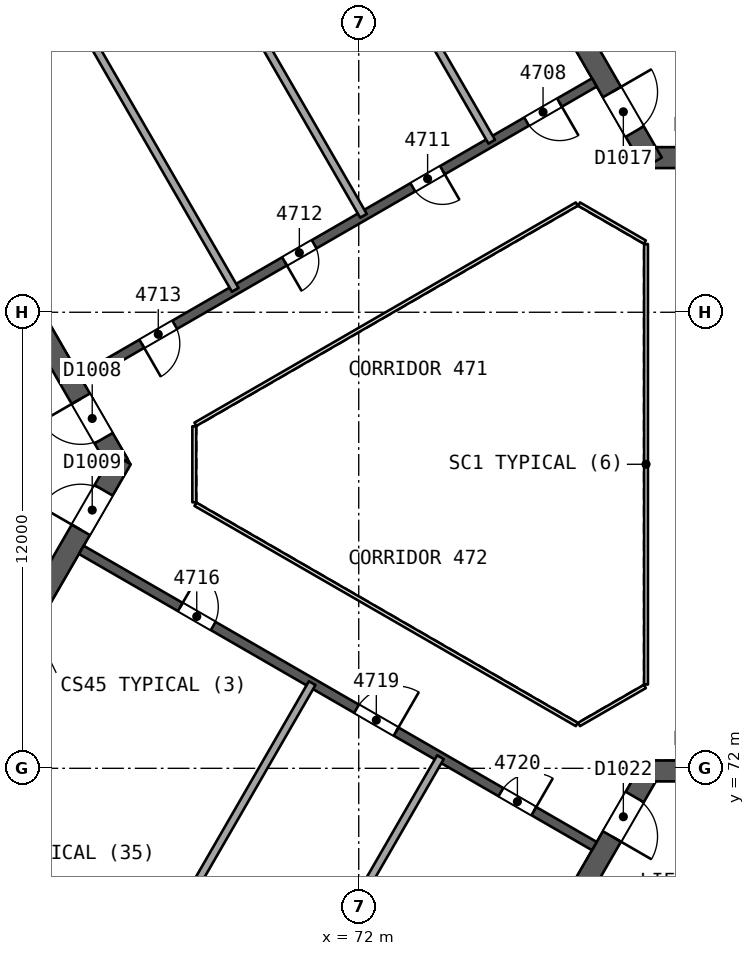
"""IFC4 building model, lengths in metres.
Left out: names, types, materials, properties, quantities, classifications, styles, units other than length and angle.
Written with IfcOpenShell. Run it as: python <this file> out.ifc"""

import sys

from ifc_helpers import new_model, si_unit, direction, frame, frame_2d, origin, place, context, subcontext, project, spatial, rectangle, extrude, element, fill, save


model = new_model("IFC4")
c1 = context("Model", 3, precision=1e-05, world=origin(), true_north=direction((0.0, 1.0)))
c2 = subcontext(c1, "Body", "Model", "MODEL_VIEW")
j1 = project(units=[si_unit("LENGTHUNIT", "METRE"), si_unit("PLANEANGLEUNIT", "RADIAN")], contexts=[c1])
p1 = place(None, origin())
s1 = spatial("IfcSite", under=j1, at=p1, CompositionType="ELEMENT")
p2 = place(p1, origin())
s2 = spatial("IfcBuilding", under=s1, at=p2, CompositionType="ELEMENT")
p3 = place(p2, frame((0.0, 0.0, 193.3)))
s3 = spatial("IfcBuildingStorey", under=s2, at=p3, CompositionType="ELEMENT", Elevation=193.3)
p4 = place(p3, frame((65.682, 80.0, 0.0), z_axis=(0.0, 0.0, 1.0), x_axis=(-0.500000202252, 0.866025287014, 0.0)))
e1 = element("IfcWall", 1, at=p4, inside=s3, PredefinedType="SHEAR", context=c2, shape_type="SweptSolid", body=[
    extrude(rectangle(XDim=10.221, YDim=0.55, at=frame_2d((5.111, 0.0))), origin(), (0.0, 0.0, 1.0), 3.7),
])
p5 = place(p4, frame((0.791, 0.0, 0.0)))
e2 = element("IfcOpeningElement", 2, at=p5, cuts=e1, PredefinedType="OPENING", context=c2, shape_type="SweptSolid", body=[
    extrude(rectangle(XDim=1.2, YDim=2.1, at=frame_2d((0.6, 1.05))), frame((0.0, 0.286, 0.0), z_axis=(0.0, -1.0, 0.0), x_axis=(1.0, 0.0, 0.0)), (0.0, 0.0, 1.0), 0.571),
])
p6 = place(p3, frame((60.709, 71.386, 0.0), z_axis=(0.0, 0.0, 1.0), x_axis=(0.500015938302, 0.866016201606, 0.0)))
e3 = element("IfcWall", 3, at=p6, inside=s3, PredefinedType="SHEAR", context=c2, shape_type="SweptSolid", body=[
    extrude(rectangle(XDim=10.105, YDim=0.55, at=frame_2d((5.053, 0.0))), origin(), (0.0, 0.0, 1.0), 3.7),
])
p7 = place(p6, frame((7.955, 0.0, 0.0)))
e4 = element("IfcOpeningElement", 4, at=p7, cuts=e3, PredefinedType="OPENING", context=c2, shape_type="SweptSolid", body=[
    extrude(rectangle(XDim=1.2, YDim=2.1, at=frame_2d((0.6, 1.05))), frame((0.0, 0.286, 0.0), z_axis=(0.0, -1.0, 0.0), x_axis=(1.0, 0.0, 0.0)), (0.0, 0.0, 1.0), 0.571),
])
p8 = place(p3, frame((79.659, 88.069, 0.0), z_axis=(0.0, 0.0, 1.0), x_axis=(1.0, 0.0, 0.0)))
e5 = element("IfcWall", 5, at=p8, inside=s3, PredefinedType="SHEAR", context=c2, shape_type="SweptSolid", body=[
    extrude(rectangle(XDim=10.221, YDim=0.55, at=frame_2d((5.111, 0.0))), origin(), (0.0, 0.0, 1.0), 3.7),
])
p9 = place(p8, frame((0.791, 0.0, 0.0)))
e6 = element("IfcOpeningElement", 6, at=p9, cuts=e5, PredefinedType="OPENING", context=c2, shape_type="SweptSolid", body=[
    extrude(rectangle(XDim=1.2, YDim=2.1, at=frame_2d((0.6, 1.05))), frame((0.0, 0.286, 0.0), z_axis=(0.0, -1.0, 0.0), x_axis=(1.0, 0.0, 0.0)), (0.0, 0.0, 1.0), 0.571),
])
p10 = place(p3, frame((74.686, 96.683, 0.0), z_axis=(0.0, 0.0, 1.0), x_axis=(0.499997818338, -0.866026663364, 0.0)))
e7 = element("IfcWall", 7, at=p10, inside=s3, PredefinedType="SHEAR", context=c2, shape_type="SweptSolid", body=[
    extrude(rectangle(XDim=10.105, YDim=0.55, at=frame_2d((5.052, 0.0))), origin(), (0.0, 0.0, 1.0), 3.7),
])
p11 = place(p10, frame((7.955, 0.0, 0.0)))
e8 = element("IfcOpeningElement", 8, at=p11, cuts=e7, PredefinedType="OPENING", context=c2, shape_type="SweptSolid", body=[
    extrude(rectangle(XDim=1.2, YDim=2.1, at=frame_2d((0.6, 1.05))), frame((0.0, 0.286, 0.0), z_axis=(0.0, -1.0, 0.0), x_axis=(1.0, 0.0, 0.0)), (0.0, 0.0, 1.0), 0.571),
])
p12 = place(p3, frame((79.659, 71.931, 0.0), z_axis=(0.0, 0.0, 1.0), x_axis=(-0.500000202252, -0.866025287014, 0.0)))
e9 = element("IfcWall", 9, at=p12, inside=s3, PredefinedType="SHEAR", context=c2, shape_type="SweptSolid", body=[
    extrude(rectangle(XDim=10.221, YDim=0.55, at=frame_2d((5.111, 0.0))), origin(), (0.0, 0.0, 1.0), 3.7),
])
p13 = place(p12, frame((0.791, 0.0, 0.0)))
e10 = element("IfcOpeningElement", 10, at=p13, cuts=e9, PredefinedType="OPENING", context=c2, shape_type="SweptSolid", body=[
    extrude(rectangle(XDim=1.2, YDim=2.1, at=frame_2d((0.6, 1.05))), frame((0.0, 0.286, 0.0), z_axis=(0.0, -1.0, 0.0), x_axis=(1.0, 0.0, 0.0)), (0.0, 0.0, 1.0), 0.571),
])
p14 = place(p3, frame((89.605, 71.931, 0.0), z_axis=(0.0, 0.0, 1.0), x_axis=(-1.0, 0.0, 0.0)))
e11 = element("IfcWall", 11, at=p14, inside=s3, PredefinedType="SHEAR", context=c2, shape_type="SweptSolid", body=[
    extrude(rectangle(XDim=10.105, YDim=0.55, at=frame_2d((5.052, 0.0))), origin(), (0.0, 0.0, 1.0), 3.7),
])
p15 = place(p14, frame((7.955, 0.0, 0.0)))
e12 = element("IfcOpeningElement", 12, at=p15, cuts=e11, PredefinedType="OPENING", context=c2, shape_type="SweptSolid", body=[
    extrude(rectangle(XDim=1.2, YDim=2.1, at=frame_2d((0.6, 1.05))), frame((0.0, 0.286, 0.0), z_axis=(0.0, -1.0, 0.0), x_axis=(1.0, 0.0, 0.0)), (0.0, 0.0, 1.0), 0.571),
])
p16 = place(p3, frame((78.2, 90.046, 0.0), z_axis=(0.0, 0.0, 1.0), x_axis=(-0.866026492143, -0.499998114903, 0.0)))
e13 = element("IfcWall", 13, at=p16, inside=s3, PredefinedType="SHEAR", context=c2, shape_type="SweptSolid", body=[
    extrude(rectangle(XDim=15.588, YDim=0.25, at=frame_2d((7.794, 0.0))), origin(), (0.0, 0.0, 1.0), 3.3),
])
p17 = place(p16, frame((1.059, 0.0, 0.0)))
e14 = element("IfcOpeningElement", 14, at=p17, cuts=e13, PredefinedType="OPENING", context=c2, shape_type="SweptSolid", body=[
    extrude(rectangle(XDim=1.0, YDim=2.1, at=frame_2d((0.5, 1.05))), frame((0.0, 0.135, 0.0), z_axis=(0.0, -1.0, 0.0), x_axis=(1.0, 0.0, 0.0)), (0.0, 0.0, 1.0), 0.271),
])
p18 = place(p16, frame((4.616, 0.0, 0.0)))
e15 = element("IfcOpeningElement", 15, at=p18, cuts=e13, PredefinedType="OPENING", context=c2, shape_type="SweptSolid", body=[
    extrude(rectangle(XDim=0.9, YDim=2.1, at=frame_2d((0.45, 1.05))), frame((0.0, 0.135, 0.0), z_axis=(0.0, -1.0, 0.0), x_axis=(1.0, 0.0, 0.0)), (0.0, 0.0, 1.0), 0.271),
])
p19 = place(p16, frame((8.513, 0.0, 0.0)))
e16 = element("IfcOpeningElement", 16, at=p19, cuts=e13, PredefinedType="OPENING", context=c2, shape_type="SweptSolid", body=[
    extrude(rectangle(XDim=0.9, YDim=2.1, at=frame_2d((0.45, 1.05))), frame((0.0, 0.135, 0.0), z_axis=(0.0, -1.0, 0.0), x_axis=(1.0, 0.0, 0.0)), (0.0, 0.0, 1.0), 0.271),
])
p20 = place(p16, frame((12.75, 0.0, 0.0)))
e17 = element("IfcOpeningElement", 17, at=p20, cuts=e13, PredefinedType="OPENING", context=c2, shape_type="SweptSolid", body=[
    extrude(rectangle(XDim=1.0, YDim=2.1, at=frame_2d((0.5, 1.05))), frame((0.0, 0.135, 0.0), z_axis=(0.0, -1.0, 0.0), x_axis=(1.0, 0.0, 0.0)), (0.0, 0.0, 1.0), 0.271),
])
p21 = place(p3, frame((64.7, 77.748, 0.0), z_axis=(0.0, 0.0, 1.0), x_axis=(0.866026492143, -0.499998114903, 0.0)))
e18 = element("IfcWall", 18, at=p21, inside=s3, PredefinedType="SHEAR", context=c2, shape_type="SweptSolid", body=[
    extrude(rectangle(XDim=15.588, YDim=0.25, at=frame_2d((7.794, 0.0))), origin(), (0.0, 0.0, 1.0), 3.3),
])
p22 = place(p21, frame((3.007, 0.0, 0.0)))
e19 = element("IfcOpeningElement", 19, at=p22, cuts=e18, PredefinedType="OPENING", context=c2, shape_type="SweptSolid", body=[
    extrude(rectangle(XDim=1.0, YDim=2.1, at=frame_2d((0.5, 1.05))), frame((0.0, 0.135, 0.0), z_axis=(0.0, -1.0, 0.0), x_axis=(1.0, 0.0, 0.0)), (0.0, 0.0, 1.0), 0.271),
])
p23 = place(p21, frame((8.363, 0.0, 0.0)))
e20 = element("IfcOpeningElement", 20, at=p23, cuts=e18, PredefinedType="OPENING", context=c2, shape_type="SweptSolid", body=[
    extrude(rectangle(XDim=1.2, YDim=2.4, at=frame_2d((0.6, 1.2))), frame((0.0, 0.135, 0.0), z_axis=(0.0, -1.0, 0.0), x_axis=(1.0, 0.0, 0.0)), (0.0, 0.0, 1.0), 0.271),
])
p24 = place(p21, frame((12.75, 0.0, 0.0)))
e21 = element("IfcOpeningElement", 21, at=p24, cuts=e18, PredefinedType="OPENING", context=c2, shape_type="SweptSolid", body=[
    extrude(rectangle(XDim=1.0, YDim=2.1, at=frame_2d((0.5, 1.05))), frame((0.0, 0.135, 0.0), z_axis=(0.0, -1.0, 0.0), x_axis=(1.0, 0.0, 0.0)), (0.0, 0.0, 1.0), 0.271),
])
for number, where, z_axis, x_axis in (
    (22, (70.023, 97.974, 0.0), (0.0, 0.0, 1.0), (0.5, -0.866, 0.0)),
    (23, (66.648, 96.025, 0.0), (0.0, 0.0, 1.0), (0.5, -0.866, 0.0)),
    (24, (63.273, 94.076, 0.0), (0.0, 0.0, 1.0), (0.5, -0.866, 0.0)),
    (25, (65.298, 64.754, 0.0), (0.0, 0.0, 1.0), (0.5, 0.866, 0.0)),
    (26, (68.673, 62.806, 0.0), (0.0, 0.0, 1.0), (0.5, 0.866, 0.0)),
):
    element("IfcWall", number, at=place(p3, frame(where, z_axis=z_axis, x_axis=x_axis)), inside=s3, PredefinedType="PARTITIONING", context=c2, shape_type="SweptSolid", body=[
        extrude(rectangle(XDim=10.954, YDim=0.2, at=frame_2d((5.477, 0.0))), origin(), (0.0, 0.0, 1.0), 3.3),
    ])
p25 = place(p3, frame((43.232, 82.678, 0.0), z_axis=(0.0, 0.0, 1.0), x_axis=(0.866025125259, 0.500000482419, 0.0)))
e27 = element("IfcWall", 27, at=p25, inside=s3, PredefinedType="SOLIDWALL", context=c2, shape_type="SweptSolid", body=[
    extrude(rectangle(XDim=52.347, YDim=0.3, at=frame_2d((26.173, 0.0))), origin(), (0.0, 0.0, 1.0), 3.3),
])
p26 = place(p25, frame((31.209, 0.0, 0.0)))
e28 = element("IfcOpeningElement", 28, at=p26, cuts=e27, PredefinedType="OPENING", context=c2, shape_type="SweptSolid", body=[
    extrude(rectangle(XDim=2.4, YDim=2.4, at=frame_2d((1.2, 1.2))), frame((0.0, 0.161, 0.0), z_axis=(0.0, -1.0, 0.0), x_axis=(1.0, 0.0, 0.0)), (0.0, 0.0, 1.0), 0.321),
])
p27 = place(p25, frame((40.7, 0.0, 0.0)))
e29 = element("IfcOpeningElement", 29, at=p27, cuts=e27, PredefinedType="OPENING", context=c2, shape_type="SweptSolid", body=[
    extrude(rectangle(XDim=2.4, YDim=2.4, at=frame_2d((1.2, 1.2))), frame((0.0, 0.161, 0.0), z_axis=(0.0, -1.0, 0.0), x_axis=(1.0, 0.0, 0.0)), (0.0, 0.0, 1.0), 0.321),
])
p28 = place(p25, frame((19.517, 0.0, 0.0)))
e30 = element("IfcOpeningElement", 30, at=p28, cuts=e27, PredefinedType="OPENING", context=c2, shape_type="SweptSolid", body=[
    extrude(rectangle(XDim=2.4, YDim=2.4, at=frame_2d((1.2, 1.2))), frame((0.0, 0.161, 0.0), z_axis=(0.0, -1.0, 0.0), x_axis=(1.0, 0.0, 0.0)), (0.0, 0.0, 1.0), 0.321),
])
p29 = place(p25, frame((9.27, 0.0, 0.0)))
e31 = element("IfcOpeningElement", 31, at=p29, cuts=e27, PredefinedType="OPENING", context=c2, shape_type="SweptSolid", body=[
    extrude(rectangle(XDim=2.4, YDim=2.4, at=frame_2d((1.2, 1.2))), frame((0.0, 0.161, 0.0), z_axis=(0.0, -1.0, 0.0), x_axis=(1.0, 0.0, 0.0)), (0.0, 0.0, 1.0), 0.321),
])
p30 = place(p25, frame((28.001, 0.0, 0.9)))
e32 = element("IfcOpeningElement", 32, at=p30, cuts=e27, PredefinedType="OPENING", context=c2, shape_type="SweptSolid", body=[
    extrude(rectangle(XDim=1.8, YDim=1.5, at=frame_2d((0.9, 0.75))), frame((0.0, 0.161, 0.0), z_axis=(0.0, -1.0, 0.0), x_axis=(1.0, 0.0, 0.0)), (0.0, 0.0, 1.0), 0.321),
])
p31 = place(p25, frame((24.104, 0.0, 0.9)))
e33 = element("IfcOpeningElement", 33, at=p31, cuts=e27, PredefinedType="OPENING", context=c2, shape_type="SweptSolid", body=[
    extrude(rectangle(XDim=1.8, YDim=1.5, at=frame_2d((0.9, 0.75))), frame((0.0, 0.161, 0.0), z_axis=(0.0, -1.0, 0.0), x_axis=(1.0, 0.0, 0.0)), (0.0, 0.0, 1.0), 0.321),
])
p32 = place(p3, frame((88.565, 51.149, 0.0), z_axis=(0.0, 0.0, 1.0), x_axis=(-0.866025125259, 0.500000482419, 0.0)))
e34 = element("IfcWall", 34, at=p32, inside=s3, PredefinedType="SOLIDWALL", context=c2, shape_type="SweptSolid", body=[
    extrude(rectangle(XDim=52.347, YDim=0.3, at=frame_2d((26.173, 0.0))), origin(), (0.0, 0.0, 1.0), 3.3),
])
p33 = place(p32, frame((29.26, 0.0, 0.0)))
e35 = element("IfcOpeningElement", 35, at=p33, cuts=e34, PredefinedType="OPENING", context=c2, shape_type="SweptSolid", body=[
    extrude(rectangle(XDim=2.4, YDim=2.4, at=frame_2d((1.2, 1.2))), frame((0.0, 0.161, 0.0), z_axis=(0.0, -1.0, 0.0), x_axis=(1.0, 0.0, 0.0)), (0.0, 0.0, 1.0), 0.321),
])
p34 = place(p32, frame((40.7, 0.0, 0.0)))
e36 = element("IfcOpeningElement", 36, at=p34, cuts=e34, PredefinedType="OPENING", context=c2, shape_type="SweptSolid", body=[
    extrude(rectangle(XDim=2.4, YDim=2.4, at=frame_2d((1.2, 1.2))), frame((0.0, 0.161, 0.0), z_axis=(0.0, -1.0, 0.0), x_axis=(1.0, 0.0, 0.0)), (0.0, 0.0, 1.0), 0.321),
])
p35 = place(p32, frame((19.517, 0.0, 0.0)))
e37 = element("IfcOpeningElement", 37, at=p35, cuts=e34, PredefinedType="OPENING", context=c2, shape_type="SweptSolid", body=[
    extrude(rectangle(XDim=2.4, YDim=2.4, at=frame_2d((1.2, 1.2))), frame((0.0, 0.161, 0.0), z_axis=(0.0, -1.0, 0.0), x_axis=(1.0, 0.0, 0.0)), (0.0, 0.0, 1.0), 0.321),
])
p36 = place(p32, frame((9.27, 0.0, 0.0)))
e38 = element("IfcOpeningElement", 38, at=p36, cuts=e34, PredefinedType="OPENING", context=c2, shape_type="SweptSolid", body=[
    extrude(rectangle(XDim=2.4, YDim=2.4, at=frame_2d((1.2, 1.2))), frame((0.0, 0.161, 0.0), z_axis=(0.0, -1.0, 0.0), x_axis=(1.0, 0.0, 0.0)), (0.0, 0.0, 1.0), 0.321),
])
p37 = place(p32, frame((24.104, 0.0, 0.9)))
e39 = element("IfcOpeningElement", 39, at=p37, cuts=e34, PredefinedType="OPENING", context=c2, shape_type="SweptSolid", body=[
    extrude(rectangle(XDim=1.8, YDim=1.5, at=frame_2d((0.9, 0.75))), frame((0.0, 0.161, 0.0), z_axis=(0.0, -1.0, 0.0), x_axis=(1.0, 0.0, 0.0)), (0.0, 0.0, 1.0), 0.321),
])
p38 = place(p3, frame((86.77, 89.486, 0.0), z_axis=(0.0, 0.0, 1.0), x_axis=(-0.86601811187, 0.500012629753, 0.0)))
e40 = element("IfcWall", 40, at=p38, inside=s3, PredefinedType="SOLIDWALL", context=c2, shape_type="SweptSolid", body=[
    extrude(rectangle(XDim=10.9, YDim=0.2, at=frame_2d((5.45, 0.0))), origin(), (0.0, 0.0, 1.0), 3.3),
])
p39 = place(p38, frame((0.575, 0.0, 0.0)))
e41 = element("IfcOpeningElement", 41, at=p39, cuts=e40, PredefinedType="OPENING", context=c2, shape_type="SweptSolid", body=[
    extrude(rectangle(XDim=1.1, YDim=2.1, at=frame_2d((0.55, 1.05))), frame((0.0, 0.11, 0.0), z_axis=(0.0, -1.0, 0.0), x_axis=(1.0, 0.0, 0.0)), (0.0, 0.0, 1.0), 0.221),
])
p40 = place(p38, frame((2.825, 0.0, 0.0)))
e42 = element("IfcOpeningElement", 42, at=p40, cuts=e40, PredefinedType="OPENING", context=c2, shape_type="SweptSolid", body=[
    extrude(rectangle(XDim=1.1, YDim=2.1, at=frame_2d((0.55, 1.05))), frame((0.0, 0.11, 0.0), z_axis=(0.0, -1.0, 0.0), x_axis=(1.0, 0.0, 0.0)), (0.0, 0.0, 1.0), 0.221),
])
p41 = place(p38, frame((5.075, 0.0, 0.0)))
e43 = element("IfcOpeningElement", 43, at=p41, cuts=e40, PredefinedType="OPENING", context=c2, shape_type="SweptSolid", body=[
    extrude(rectangle(XDim=1.1, YDim=2.1, at=frame_2d((0.55, 1.05))), frame((0.0, 0.11, 0.0), z_axis=(0.0, -1.0, 0.0), x_axis=(1.0, 0.0, 0.0)), (0.0, 0.0, 1.0), 0.221),
])
p42 = place(p38, frame((7.325, 0.0, 0.0)))
e44 = element("IfcOpeningElement", 44, at=p42, cuts=e40, PredefinedType="OPENING", context=c2, shape_type="SweptSolid", body=[
    extrude(rectangle(XDim=1.1, YDim=2.1, at=frame_2d((0.55, 1.05))), frame((0.0, 0.11, 0.0), z_axis=(0.0, -1.0, 0.0), x_axis=(1.0, 0.0, 0.0)), (0.0, 0.0, 1.0), 0.221),
])
p43 = place(p3, frame((89.33, 90.872, 0.0), z_axis=(0.0, 0.0, 1.0), x_axis=(-0.866027589512, 0.49999621419, 0.0)))
e45 = element("IfcWall", 45, at=p43, inside=s3, PredefinedType="SOLIDWALL", context=c2, shape_type="SweptSolid", body=[
    extrude(rectangle(XDim=10.524, YDim=0.2, at=frame_2d((5.262, 0.0))), origin(), (0.0, 0.0, 1.0), 3.3),
])
p44 = place(p43, frame((0.312, 0.0, 0.0)))
e46 = element("IfcOpeningElement", 46, at=p44, cuts=e45, PredefinedType="OPENING", context=c2, shape_type="SweptSolid", body=[
    extrude(rectangle(XDim=0.9, YDim=2.1, at=frame_2d((0.45, 1.05))), frame((0.0, 0.11, 0.0), z_axis=(0.0, -1.0, 0.0), x_axis=(1.0, 0.0, 0.0)), (0.0, 0.0, 1.0), 0.221),
])
p45 = place(p3, frame((77.135, 64.952, 0.0), z_axis=(0.0, 0.0, 1.0), x_axis=(0.866031916153, 0.499988720078, 0.0)))
e47 = element("IfcWall", 47, at=p45, inside=s3, PredefinedType="SOLIDWALL", context=c2, shape_type="SweptSolid", body=[
    extrude(rectangle(XDim=11.35, YDim=0.2, at=frame_2d((5.675, 0.0))), origin(), (0.0, 0.0, 1.0), 3.3),
])
p46 = place(p3, frame((79.56, 74.206, 0.0), z_axis=(0.0, 0.0, 1.0), x_axis=(0.0, 1.0, 0.0)))
e48 = element("IfcWall", 48, at=p46, inside=s3, PredefinedType="PARTITIONING", context=c2, shape_type="SweptSolid", body=[
    extrude(rectangle(XDim=11.588, YDim=0.1, at=frame_2d((5.794, 0.0))), origin(), (0.0, 0.0, 1.0), 3.3),
])
p47 = place(p3, frame((79.53, 85.846, 0.0), z_axis=(0.0, 0.0, 1.0), x_axis=(-0.866041268327, 0.499972520799, 0.0)))
e49 = element("IfcWall", 49, at=p47, inside=s3, PredefinedType="PARTITIONING", context=c2, shape_type="SweptSolid", body=[
    extrude(rectangle(XDim=2.0, YDim=0.1, at=frame_2d((1.0, 0.0))), origin(), (0.0, 0.0, 1.0), 3.3),
])
p48 = place(p3, frame((77.738, 86.846, 0.0), z_axis=(0.0, 0.0, 1.0), x_axis=(-0.866026658274, -0.499997827154, 0.0)))
e50 = element("IfcWall", 50, at=p48, inside=s3, PredefinedType="PARTITIONING", context=c2, shape_type="SweptSolid", body=[
    extrude(rectangle(XDim=11.588, YDim=0.1, at=frame_2d((5.794, 0.0))), origin(), (0.0, 0.0, 1.0), 3.3),
])
p49 = place(p3, frame((67.672, 81.0, 0.0), z_axis=(0.0, 0.0, 1.0), x_axis=(0.0, -1.0, 0.0)))
e51 = element("IfcWall", 51, at=p49, inside=s3, PredefinedType="PARTITIONING", context=c2, shape_type="SweptSolid", body=[
    extrude(rectangle(XDim=2.0, YDim=0.1, at=frame_2d((1.0, 0.0))), origin(), (0.0, 0.0, 1.0), 3.3),
])
p50 = place(p3, frame((67.702, 78.948, 0.0), z_axis=(0.0, 0.0, 1.0), x_axis=(0.866026658274, -0.499997827154, 0.0)))
e52 = element("IfcWall", 52, at=p50, inside=s3, PredefinedType="PARTITIONING", context=c2, shape_type="SweptSolid", body=[
    extrude(rectangle(XDim=11.588, YDim=0.1, at=frame_2d((5.794, 0.0))), origin(), (0.0, 0.0, 1.0), 3.3),
])
p51 = place(p3, frame((77.798, 73.154, 0.0), z_axis=(0.0, 0.0, 1.0), x_axis=(0.866041268327, 0.499972520799, 0.0)))
e53 = element("IfcWall", 53, at=p51, inside=s3, PredefinedType="PARTITIONING", context=c2, shape_type="SweptSolid", body=[
    extrude(rectangle(XDim=2.0, YDim=0.1, at=frame_2d((1.0, 0.0))), origin(), (0.0, 0.0, 1.0), 3.3),
])
p52 = place(p17, origin())
e54 = element("IfcDoor", 54, at=p52, inside=s3, OperationType="SINGLE_SWING_LEFT", PredefinedType="NOTDEFINED", context=c2, shape_type="SweptSolid", body=[
    extrude(rectangle(XDim=1.0, YDim=2.1, at=frame_2d((0.5, 1.05))), frame((0.0, 0.025, 0.0), z_axis=(0.0, -1.0, 0.0), x_axis=(1.0, 0.0, 0.0)), (0.0, 0.0, 1.0), 0.05),
])
fill(e14, e54)
p53 = place(p18, origin())
e55 = element("IfcDoor", 55, at=p53, inside=s3, OperationType="SINGLE_SWING_LEFT", PredefinedType="NOTDEFINED", context=c2, shape_type="SweptSolid", body=[
    extrude(rectangle(XDim=0.9, YDim=2.1, at=frame_2d((0.45, 1.05))), frame((0.0, 0.025, 0.0), z_axis=(0.0, -1.0, 0.0), x_axis=(1.0, 0.0, 0.0)), (0.0, 0.0, 1.0), 0.05),
])
fill(e15, e55)
p54 = place(p19, origin())
e56 = element("IfcDoor", 56, at=p54, inside=s3, OperationType="SINGLE_SWING_RIGHT", PredefinedType="NOTDEFINED", context=c2, shape_type="SweptSolid", body=[
    extrude(rectangle(XDim=0.9, YDim=2.1, at=frame_2d((0.45, 1.05))), frame((0.0, 0.025, 0.0), z_axis=(0.0, -1.0, 0.0), x_axis=(1.0, 0.0, 0.0)), (0.0, 0.0, 1.0), 0.05),
])
fill(e16, e56)
p55 = place(p20, origin())
e57 = element("IfcDoor", 57, at=p55, inside=s3, OperationType="SINGLE_SWING_RIGHT", PredefinedType="NOTDEFINED", context=c2, shape_type="SweptSolid", body=[
    extrude(rectangle(XDim=1.0, YDim=2.1, at=frame_2d((0.5, 1.05))), frame((0.0, 0.025, 0.0), z_axis=(0.0, -1.0, 0.0), x_axis=(1.0, 0.0, 0.0)), (0.0, 0.0, 1.0), 0.05),
])
fill(e17, e57)
p56 = place(p22, origin())
e58 = element("IfcDoor", 58, at=p56, inside=s3, OperationType="SINGLE_SWING_LEFT", PredefinedType="NOTDEFINED", context=c2, shape_type="SweptSolid", body=[
    extrude(rectangle(XDim=1.0, YDim=2.1, at=frame_2d((0.5, 1.05))), frame((0.0, 0.025, 0.0), z_axis=(0.0, -1.0, 0.0), x_axis=(1.0, 0.0, 0.0)), (0.0, 0.0, 1.0), 0.05),
])
fill(e19, e58)
p57 = place(p23, origin())
e59 = element("IfcDoor", 59, at=p57, inside=s3, OperationType="SINGLE_SWING_RIGHT", PredefinedType="NOTDEFINED", context=c2, shape_type="SweptSolid", body=[
    extrude(rectangle(XDim=1.2, YDim=2.4, at=frame_2d((0.6, 1.2))), frame((0.0, 0.025, 0.0), z_axis=(0.0, -1.0, 0.0), x_axis=(1.0, 0.0, 0.0)), (0.0, 0.0, 1.0), 0.05),
])
fill(e20, e59)
p58 = place(p24, origin())
e60 = element("IfcDoor", 60, at=p58, inside=s3, OperationType="SINGLE_SWING_RIGHT", PredefinedType="NOTDEFINED", context=c2, shape_type="SweptSolid", body=[
    extrude(rectangle(XDim=1.0, YDim=2.1, at=frame_2d((0.5, 1.05))), frame((0.0, 0.025, 0.0), z_axis=(0.0, -1.0, 0.0), x_axis=(1.0, 0.0, 0.0)), (0.0, 0.0, 1.0), 0.05),
])
fill(e21, e60)
p59 = place(p5, origin())
e61 = element("IfcDoor", 61, at=p59, inside=s3, OperationType="SINGLE_SWING_RIGHT", PredefinedType="NOTDEFINED", context=c2, shape_type="SweptSolid", body=[
    extrude(rectangle(XDim=1.2, YDim=2.1, at=frame_2d((0.6, 1.05))), frame((0.0, 0.025, 0.0), z_axis=(0.0, -1.0, 0.0), x_axis=(1.0, 0.0, 0.0)), (0.0, 0.0, 1.0), 0.05),
])
fill(e2, e61)
p60 = place(p7, origin())
e62 = element("IfcDoor", 62, at=p60, inside=s3, OperationType="SINGLE_SWING_LEFT", PredefinedType="NOTDEFINED", context=c2, shape_type="SweptSolid", body=[
    extrude(rectangle(XDim=1.2, YDim=2.1, at=frame_2d((0.6, 1.05))), frame((0.0, 0.025, 0.0), z_axis=(0.0, -1.0, 0.0), x_axis=(1.0, 0.0, 0.0)), (0.0, 0.0, 1.0), 0.05),
])
fill(e4, e62)
p61 = place(p11, origin())
e63 = element("IfcDoor", 63, at=p61, inside=s3, OperationType="SINGLE_SWING_LEFT", PredefinedType="NOTDEFINED", context=c2, shape_type="SweptSolid", body=[
    extrude(rectangle(XDim=1.2, YDim=2.1, at=frame_2d((0.6, 1.05))), frame((0.0, 0.025, 0.0), z_axis=(0.0, -1.0, 0.0), x_axis=(1.0, 0.0, 0.0)), (0.0, 0.0, 1.0), 0.05),
])
fill(e8, e63)
p62 = place(p13, origin())
e64 = element("IfcDoor", 64, at=p62, inside=s3, OperationType="SINGLE_SWING_RIGHT", PredefinedType="NOTDEFINED", context=c2, shape_type="SweptSolid", body=[
    extrude(rectangle(XDim=1.2, YDim=2.1, at=frame_2d((0.6, 1.05))), frame((0.0, 0.025, 0.0), z_axis=(0.0, -1.0, 0.0), x_axis=(1.0, 0.0, 0.0)), (0.0, 0.0, 1.0), 0.05),
])
fill(e10, e64)
save(model, sys.argv[1])
